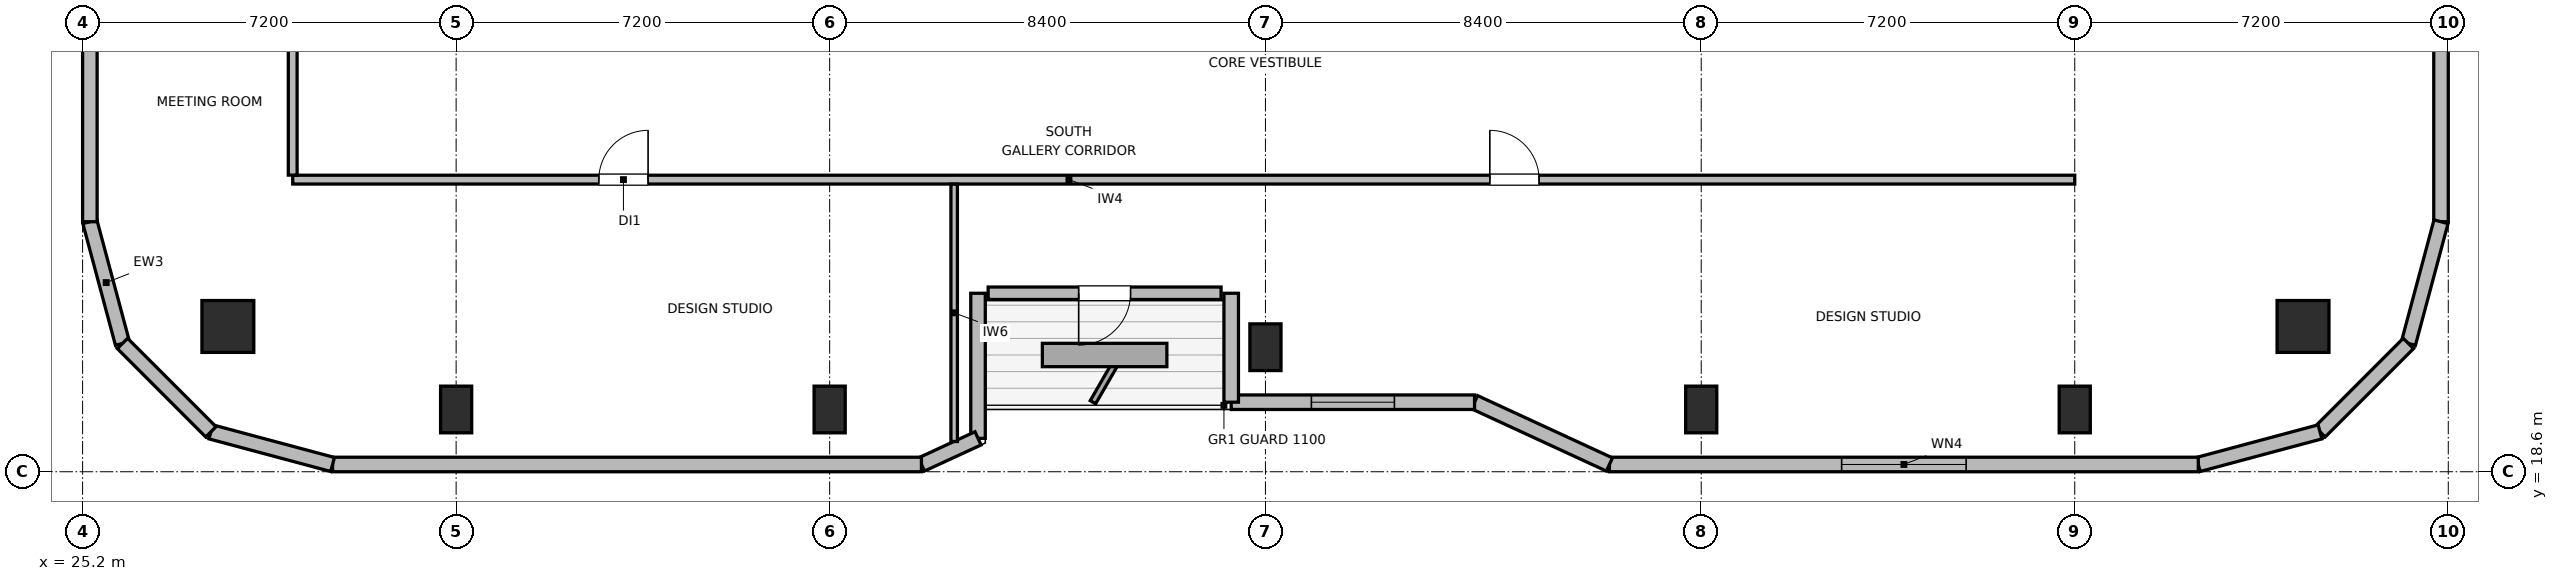
"""IFC4 building model, lengths in metres.
Left out: names, types, materials, properties, quantities, classifications, styles, units other than length and angle.
Written with IfcOpenShell. Run it as: python <this file> out.ifc"""

import sys

from ifc_helpers import new_model, si_unit, direction, frame, frame_2d, origin, origin_2d, place, context, subcontext, project, spatial, rectangle, circle, extrude, element, fill, save


model = new_model("IFC4")
c1 = context("Model", 3, precision=1e-05, world=origin(), true_north=direction((0.0, 1.0)))
c2 = subcontext(c1, "Body", "Model", "MODEL_VIEW")
j1 = project(units=[si_unit("LENGTHUNIT", "METRE"), si_unit("PLANEANGLEUNIT", "RADIAN")], contexts=[c1])
p1 = place(None, origin())
s1 = spatial("IfcSite", under=j1, at=p1, CompositionType="ELEMENT")
p2 = place(p1, origin())
s2 = spatial("IfcBuilding", under=s1, at=p2, CompositionType="ELEMENT")
p3 = place(p2, frame((0.0, 0.0, 286.2)))
s3 = spatial("IfcBuildingStorey", under=s2, at=p3, CompositionType="ELEMENT", Elevation=286.2)
for number, where, z_axis, x_axis in (
    (1, (28.0, 21.4, 0.0), (0.0, 0.0, 1.0), (1.0, 0.0, 0.0)),
    (2, (68.0, 21.4, 0.0), (0.0, 0.0, 1.0), (1.0, 0.0, 0.0)),
):
    element("IfcColumn", number, at=place(p3, frame(where, z_axis=z_axis, x_axis=x_axis)), inside=s3, PredefinedType="COLUMN", context=c2, shape_type="SweptSolid", body=[
        extrude(circle(Radius=0.5, at=origin_2d()), origin(), (0.0, 0.0, 1.0), 3.9),
    ])
for number, where, z_axis, x_axis in (
    (3, (32.4, 19.8, 0.0), (0.0, 0.0, 1.0), (1.0, 0.0, 0.0)),
    (4, (39.6, 19.8, 0.0), (0.0, 0.0, 1.0), (1.0, 0.0, 0.0)),
    (5, (48.0, 21.0, 0.0), (0.0, 0.0, 1.0), (1.0, 0.0, 0.0)),
    (6, (56.4, 19.8, 0.0), (0.0, 0.0, 1.0), (1.0, 0.0, 0.0)),
    (7, (63.6, 19.8, 0.0), (0.0, 0.0, 1.0), (1.0, 0.0, 0.0)),
):
    element("IfcColumn", number, at=place(p3, frame(where, z_axis=z_axis, x_axis=x_axis)), inside=s3, PredefinedType="COLUMN", context=c2, shape_type="SweptSolid", body=[
        extrude(rectangle(XDim=0.6, YDim=0.9, at=origin_2d()), origin(), (0.0, 0.0, 1.0), 3.9),
    ])
p4 = place(p3, frame((25.969, 21.073, 0.0), z_axis=(0.0, 0.0, 1.0), x_axis=(-0.258751159445, 0.965944013639, 0.0)))
e8 = element("IfcWall", 8, at=p4, inside=s3, PredefinedType="SOLIDWALL", context=c2, shape_type="SweptSolid", body=[
    extrude(rectangle(XDim=2.429, YDim=0.28, at=frame_2d((1.214, 0.0))), origin(), (0.0, 0.0, 1.0), 3.68),
])
p5 = place(p3, frame((25.34, 23.418, 0.0), z_axis=(0.0, 0.0, 1.0), x_axis=(0.0, 1.0, 0.0)))
e9 = element("IfcWall", 9, at=p5, inside=s3, PredefinedType="SOLIDWALL", context=c2, shape_type="SweptSolid", body=[
    extrude(rectangle(XDim=5.842, YDim=0.28, at=frame_2d((2.921, 0.0))), origin(), (0.0, 0.0, 1.0), 3.68),
])
p6 = place(p3, frame((70.66, 37.66, 0.0), z_axis=(0.0, 0.0, 1.0), x_axis=(0.0, -1.0, 0.0)))
e10 = element("IfcWall", 10, at=p6, inside=s3, PredefinedType="SOLIDWALL", context=c2, shape_type="SweptSolid", body=[
    extrude(rectangle(XDim=14.241, YDim=0.28, at=frame_2d((7.121, 0.0))), origin(), (0.0, 0.0, 1.0), 3.68),
])
p7 = place(p6, frame((6.321, 0.0, 0.85)))
e11 = element("IfcOpeningElement", 11, at=p7, cuts=e10, PredefinedType="OPENING", context=c2, shape_type="SweptSolid", body=[
    extrude(rectangle(XDim=1.6, YDim=1.0, at=frame_2d((0.8, 0.5))), frame((0.0, 0.15, 0.0), z_axis=(0.0, -1.0, 0.0), x_axis=(1.0, 0.0, 0.0)), (0.0, 0.0, 1.0), 0.3),
])
p8 = place(p3, frame((70.66, 23.418, 0.0), z_axis=(0.0, 0.0, 1.0), x_axis=(-0.258751159445, -0.965944013639, 0.0)))
e12 = element("IfcWall", 12, at=p8, inside=s3, PredefinedType="SOLIDWALL", context=c2, shape_type="SweptSolid", body=[
    extrude(rectangle(XDim=2.429, YDim=0.28, at=frame_2d((1.214, 0.0))), origin(), (0.0, 0.0, 1.0), 3.68),
])
p9 = place(p3, frame((70.031, 21.073, 0.0), z_axis=(0.0, 0.0, 1.0), x_axis=(-0.707106781187, -0.707106781187, 0.0)))
e13 = element("IfcWall", 13, at=p9, inside=s3, PredefinedType="SOLIDWALL", context=c2, shape_type="SweptSolid", body=[
    extrude(rectangle(XDim=2.41, YDim=0.28, at=frame_2d((1.205, 0.0))), origin(), (0.0, 0.0, 1.0), 3.68),
])
p10 = place(p3, frame((68.327, 19.368, 0.0), z_axis=(0.0, 0.0, 1.0), x_axis=(-0.965937282298, -0.25877628691, 0.0)))
e14 = element("IfcWall", 14, at=p10, inside=s3, PredefinedType="SOLIDWALL", context=c2, shape_type="SweptSolid", body=[
    extrude(rectangle(XDim=2.428, YDim=0.28, at=frame_2d((1.214, 0.0))), origin(), (0.0, 0.0, 1.0), 3.68),
])
p11 = place(p3, frame((65.982, 18.74, 0.0), z_axis=(0.0, 0.0, 1.0), x_axis=(-1.0, 0.0, 0.0)))
e15 = element("IfcWall", 15, at=p11, inside=s3, PredefinedType="SOLIDWALL", context=c2, shape_type="SweptSolid", body=[
    extrude(rectangle(XDim=11.351, YDim=0.28, at=frame_2d((5.676, 0.0))), origin(), (0.0, 0.0, 1.0), 3.68),
])
p12 = place(p11, frame((4.475, 0.0, 0.85)))
e16 = element("IfcOpeningElement", 16, at=p12, cuts=e15, PredefinedType="OPENING", context=c2, shape_type="SweptSolid", body=[
    extrude(rectangle(XDim=2.4, YDim=1.15, at=frame_2d((1.2, 0.575))), frame((0.0, 0.15, 0.0), z_axis=(0.0, -1.0, 0.0), x_axis=(1.0, 0.0, 0.0)), (0.0, 0.0, 1.0), 0.3),
])
p13 = place(p3, frame((54.631, 18.74, 0.0), z_axis=(0.0, 0.0, 1.0), x_axis=(-0.907956889006, 0.419063584324, 0.0)))
e17 = element("IfcWall", 17, at=p13, inside=s3, PredefinedType="SOLIDWALL", context=c2, shape_type="SweptSolid", body=[
    extrude(rectangle(XDim=2.864, YDim=0.28, at=frame_2d((1.432, 0.0))), origin(), (0.0, 0.0, 1.0), 2.265),
])
p14 = place(p3, frame((52.031, 19.94, 0.0), z_axis=(0.0, 0.0, 1.0), x_axis=(-1.0, 0.0, 0.0)))
e18 = element("IfcWall", 18, at=p14, inside=s3, PredefinedType="SOLIDWALL", context=c2, shape_type="SweptSolid", body=[
    extrude(rectangle(XDim=4.691, YDim=0.28, at=frame_2d((2.345, 0.0))), origin(), (0.0, 0.0, 1.0), 2.265),
])
p15 = place(p14, frame((1.545, 0.0, 0.85)))
e19 = element("IfcOpeningElement", 19, at=p15, cuts=e18, PredefinedType="OPENING", context=c2, shape_type="SweptSolid", body=[
    extrude(rectangle(XDim=1.6, YDim=1.0, at=frame_2d((0.8, 0.5))), frame((0.0, 0.15, 0.0), z_axis=(0.0, -1.0, 0.0), x_axis=(1.0, 0.0, 0.0)), (0.0, 0.0, 1.0), 0.3),
])
p16 = place(p3, frame((47.34, 19.94, 0.0), z_axis=(0.0, 0.0, 1.0), x_axis=(0.0, 1.0, 0.0)))
e20 = element("IfcWall", 20, at=p16, inside=s3, PredefinedType="SOLIDWALL", context=c2, shape_type="SweptSolid", body=[
    extrude(rectangle(XDim=2.1, YDim=0.28, at=frame_2d((1.05, 0.0))), origin(), (0.0, 0.0, 1.0), 2.265),
])
p17 = place(p3, frame((47.145, 22.04, 0.0), z_axis=(0.0, 0.0, 1.0), x_axis=(-1.0, 0.0, 0.0)))
e21 = element("IfcWall", 21, at=p17, inside=s3, PredefinedType="SOLIDWALL", context=c2, shape_type="SweptSolid", body=[
    extrude(rectangle(XDim=4.49, YDim=0.24, at=frame_2d((2.245, 0.0))), origin(), (0.0, 0.0, 1.0), 3.68),
])
p18 = place(p17, frame((1.745, 0.0, 0.0)))
e22 = element("IfcOpeningElement", 22, at=p18, cuts=e21, PredefinedType="OPENING", context=c2, shape_type="SweptSolid", body=[
    extrude(rectangle(XDim=1.0, YDim=2.02, at=frame_2d((0.5, 1.01))), frame((0.0, 0.13, 0.0), z_axis=(0.0, -1.0, 0.0), x_axis=(1.0, 0.0, 0.0)), (0.0, 0.0, 1.0), 0.26),
])
p19 = place(p3, frame((42.46, 22.04, 0.0), z_axis=(0.0, 0.0, 1.0), x_axis=(0.0, -1.0, 0.0)))
e23 = element("IfcWall", 23, at=p19, inside=s3, PredefinedType="SOLIDWALL", context=c2, shape_type="SweptSolid", body=[
    extrude(rectangle(XDim=2.796, YDim=0.28, at=frame_2d((1.398, 0.0))), origin(), (0.0, 0.0, 1.0), 2.265),
])
p20 = place(p3, frame((42.46, 19.244, 0.0), z_axis=(0.0, 0.0, 1.0), x_axis=(-0.907893953211, -0.419199916176, 0.0)))
e24 = element("IfcWall", 24, at=p20, inside=s3, PredefinedType="SOLIDWALL", context=c2, shape_type="SweptSolid", body=[
    extrude(rectangle(XDim=1.201, YDim=0.28, at=frame_2d((0.601, 0.0))), origin(), (0.0, 0.0, 1.0), 3.68),
])
p21 = place(p3, frame((41.369, 18.74, 0.0), z_axis=(0.0, 0.0, 1.0), x_axis=(-1.0, 0.0, 0.0)))
e25 = element("IfcWall", 25, at=p21, inside=s3, PredefinedType="SOLIDWALL", context=c2, shape_type="SweptSolid", body=[
    extrude(rectangle(XDim=11.351, YDim=0.28, at=frame_2d((5.675, 0.0))), origin(), (0.0, 0.0, 1.0), 3.68),
])
p22 = place(p3, frame((30.018, 18.74, 0.0), z_axis=(0.0, 0.0, 1.0), x_axis=(-0.965937282298, 0.25877628691, 0.0)))
e26 = element("IfcWall", 26, at=p22, inside=s3, PredefinedType="SOLIDWALL", context=c2, shape_type="SweptSolid", body=[
    extrude(rectangle(XDim=2.428, YDim=0.28, at=frame_2d((1.214, 0.0))), origin(), (0.0, 0.0, 1.0), 3.68),
])
p23 = place(p3, frame((27.673, 19.368, 0.0), z_axis=(0.0, 0.0, 1.0), x_axis=(-0.707106781187, 0.707106781187, 0.0)))
e27 = element("IfcWall", 27, at=p23, inside=s3, PredefinedType="SOLIDWALL", context=c2, shape_type="SweptSolid", body=[
    extrude(rectangle(XDim=2.41, YDim=0.28, at=frame_2d((1.205, 0.0))), origin(), (0.0, 0.0, 1.0), 3.68),
])
p24 = place(p3, frame((29.25, 24.23, 0.0), z_axis=(0.0, 0.0, 1.0), x_axis=(1.0, 0.0, 0.0)))
e28 = element("IfcWall", 28, at=p24, inside=s3, PredefinedType="PARTITIONING", context=c2, shape_type="SweptSolid", body=[
    extrude(rectangle(XDim=34.35, YDim=0.17, at=frame_2d((17.175, 0.0))), origin(), (0.0, 0.0, 1.0), 3.68),
])
p25 = place(p24, frame((5.9, 0.0, 0.0)))
e29 = element("IfcOpeningElement", 29, at=p25, cuts=e28, PredefinedType="OPENING", context=c2, shape_type="SweptSolid", body=[
    extrude(rectangle(XDim=0.95, YDim=2.04, at=frame_2d((0.475, 1.02))), frame((0.0, 0.095, 0.0), z_axis=(0.0, -1.0, 0.0), x_axis=(1.0, 0.0, 0.0)), (0.0, 0.0, 1.0), 0.19),
])
p26 = place(p24, frame((23.075, 0.0, 0.0)))
e30 = element("IfcOpeningElement", 30, at=p26, cuts=e28, PredefinedType="OPENING", context=c2, shape_type="SweptSolid", body=[
    extrude(rectangle(XDim=0.95, YDim=2.04, at=frame_2d((0.475, 1.02))), frame((0.0, 0.095, 0.0), z_axis=(0.0, -1.0, 0.0), x_axis=(1.0, 0.0, 0.0)), (0.0, 0.0, 1.0), 0.19),
])
p27 = place(p3, frame((29.25, 24.317, 0.0), z_axis=(0.0, 0.0, 1.0), x_axis=(0.0, 1.0, 0.0)))
e31 = element("IfcWall", 31, at=p27, inside=s3, PredefinedType="PARTITIONING", context=c2, shape_type="SweptSolid", body=[
    extrude(rectangle(XDim=23.366, YDim=0.17, at=frame_2d((11.683, 0.0))), origin(), (0.0, 0.0, 1.0), 3.68),
])
p28 = place(p27, frame((4.923, 0.0, 0.0)))
e32 = element("IfcOpeningElement", 32, at=p28, cuts=e31, PredefinedType="OPENING", context=c2, shape_type="SweptSolid", body=[
    extrude(rectangle(XDim=0.95, YDim=2.04, at=frame_2d((0.475, 1.02))), frame((0.0, 0.095, 0.0), z_axis=(0.0, -1.0, 0.0), x_axis=(1.0, 0.0, 0.0)), (0.0, 0.0, 1.0), 0.19),
])
p29 = place(p27, frame((16.693, 0.0, 0.0)))
e33 = element("IfcOpeningElement", 33, at=p29, cuts=e31, PredefinedType="OPENING", context=c2, shape_type="SweptSolid", body=[
    extrude(rectangle(XDim=0.95, YDim=2.04, at=frame_2d((0.475, 1.02))), frame((0.0, 0.095, 0.0), z_axis=(0.0, -1.0, 0.0), x_axis=(1.0, 0.0, 0.0)), (0.0, 0.0, 1.0), 0.19),
])
p30 = place(p3, frame((42.0, 19.183, 0.0), z_axis=(0.0, 0.0, 1.0), x_axis=(0.0, 1.0, 0.0)))
e34 = element("IfcWall", 34, at=p30, inside=s3, PredefinedType="PARTITIONING", context=c2, shape_type="SweptSolid", body=[
    extrude(rectangle(XDim=4.96, YDim=0.125, at=frame_2d((2.48, 0.0))), origin(), (0.0, 0.0, 1.0), 3.043),
])
p31 = place(p12, origin())
e35 = element("IfcWindow", 35, at=p31, inside=s3, PartitioningType="SINGLE_PANEL", PredefinedType="WINDOW", context=c2, shape_type="SweptSolid", body=[
    extrude(rectangle(XDim=2.4, YDim=1.15, at=frame_2d((1.2, 0.575))), frame((0.0, 0.03, 0.0), z_axis=(0.0, -1.0, 0.0), x_axis=(1.0, 0.0, 0.0)), (0.0, 0.0, 1.0), 0.06),
])
fill(e16, e35)
p32 = place(p15, origin())
e36 = element("IfcWindow", 36, at=p32, inside=s3, PartitioningType="SINGLE_PANEL", PredefinedType="WINDOW", context=c2, shape_type="SweptSolid", body=[
    extrude(rectangle(XDim=1.6, YDim=1.0, at=frame_2d((0.8, 0.5))), frame((0.0, 0.03, 0.0), z_axis=(0.0, -1.0, 0.0), x_axis=(1.0, 0.0, 0.0)), (0.0, 0.0, 1.0), 0.06),
])
fill(e19, e36)
p33 = place(p18, origin())
e37 = element("IfcDoor", 37, at=p33, inside=s3, OperationType="SINGLE_SWING_RIGHT", PredefinedType="DOOR", context=c2, shape_type="SweptSolid", body=[
    extrude(rectangle(XDim=1.0, YDim=2.02, at=frame_2d((0.5, 1.01))), frame((0.0, 0.025, 0.0), z_axis=(0.0, -1.0, 0.0), x_axis=(1.0, 0.0, 0.0)), (0.0, 0.0, 1.0), 0.05),
])
fill(e22, e37)
p34 = place(p25, origin())
e38 = element("IfcDoor", 38, at=p34, inside=s3, OperationType="SINGLE_SWING_RIGHT", PredefinedType="DOOR", context=c2, shape_type="SweptSolid", body=[
    extrude(rectangle(XDim=0.95, YDim=2.04, at=frame_2d((0.475, 1.02))), frame((0.0, 0.025, 0.0), z_axis=(0.0, -1.0, 0.0), x_axis=(1.0, 0.0, 0.0)), (0.0, 0.0, 1.0), 0.05),
])
fill(e29, e38)
p35 = place(p26, origin())
e39 = element("IfcDoor", 39, at=p35, inside=s3, OperationType="SINGLE_SWING_LEFT", PredefinedType="DOOR", context=c2, shape_type="SweptSolid", body=[
    extrude(rectangle(XDim=0.95, YDim=2.04, at=frame_2d((0.475, 1.02))), frame((0.0, 0.025, 0.0), z_axis=(0.0, -1.0, 0.0), x_axis=(1.0, 0.0, 0.0)), (0.0, 0.0, 1.0), 0.05),
])
fill(e30, e39)
save(model, sys.argv[1])
